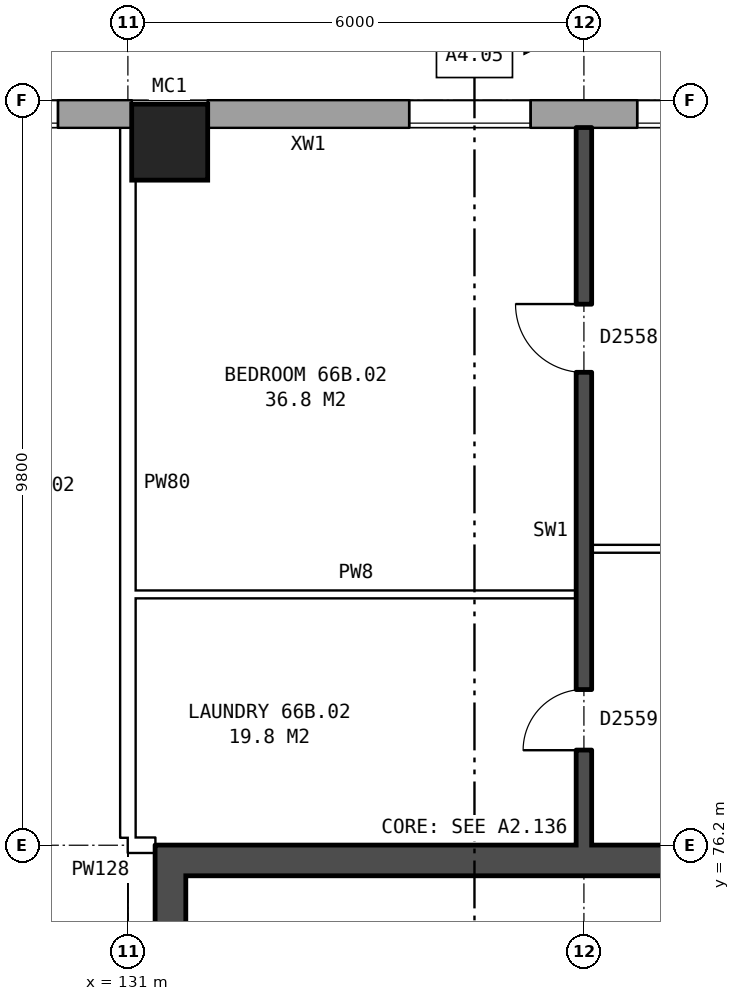
"""IFC4 building model, lengths in metres.
Left out: names, types, materials, properties, quantities, classifications, styles, units other than length and angle.
Written with IfcOpenShell. Run it as: python <this file> out.ifc"""

import sys

from ifc_helpers import new_model, si_unit, direction, frame, frame_2d, origin, origin_2d, place, context, subcontext, project, spatial, rectangle, hollow_rectangle, extrude, element, fill, save


model = new_model("IFC4")
c1 = context("Model", 3, precision=1e-05, world=origin(), true_north=direction((0.0, 1.0)))
c2 = subcontext(c1, "Body", "Model", "MODEL_VIEW")
j1 = project(units=[si_unit("LENGTHUNIT", "METRE"), si_unit("PLANEANGLEUNIT", "RADIAN")], contexts=[c1])
p1 = place(None, origin())
s1 = spatial("IfcSite", under=j1, at=p1, CompositionType="ELEMENT")
p2 = place(p1, origin())
s2 = spatial("IfcBuilding", under=s1, at=p2, CompositionType="ELEMENT")
p3 = place(p2, frame((0.0, 0.0, 233.8)))
s3 = spatial("IfcBuildingStorey", under=s2, at=p3, CompositionType="ELEMENT", Elevation=233.8)
p4 = place(p3, frame((131.55, 85.45, 0.0), z_axis=(0.0, 0.0, 1.0), x_axis=(1.0, 0.0, 0.0)))
e1 = element("IfcColumn", 1, at=p4, inside=s3, PredefinedType="COLUMN", context=c2, shape_type="SweptSolid", body=[
    extrude(hollow_rectangle(XDim=1.0, YDim=1.0, WallThickness=0.055, at=origin_2d()), origin(), (0.0, 0.0, 1.0), 3.1),
])
p5 = place(p3, frame((165.925, 85.82, 0.0), z_axis=(0.0, 0.0, 1.0), x_axis=(-1.0, 0.0, 0.0)))
e2 = element("IfcWall", 2, at=p5, inside=s3, PredefinedType="STANDARD", context=c2, shape_type="SweptSolid", body=[
    extrude(rectangle(XDim=33.875, YDim=0.36, at=frame_2d((16.938, 0.0))), origin(), (0.0, 0.0, 1.0), 2.85),
])
p6 = place(p5, frame((2.625, 0.0, 0.8)))
e3 = element("IfcOpeningElement", 3, at=p6, cuts=e2, PredefinedType="OPENING", context=c2, shape_type="SweptSolid", body=[
    extrude(rectangle(XDim=1.6, YDim=1.8, at=frame_2d((0.8, 0.9))), frame((0.0, 0.19, 0.0), z_axis=(0.0, -1.0, 0.0), x_axis=(1.0, 0.0, 0.0)), (0.0, 0.0, 1.0), 0.38),
])
p7 = place(p5, frame((5.625, 0.0, 0.8)))
e4 = element("IfcOpeningElement", 4, at=p7, cuts=e2, PredefinedType="OPENING", context=c2, shape_type="SweptSolid", body=[
    extrude(rectangle(XDim=1.6, YDim=1.8, at=frame_2d((0.8, 0.9))), frame((0.0, 0.19, 0.0), z_axis=(0.0, -1.0, 0.0), x_axis=(1.0, 0.0, 0.0)), (0.0, 0.0, 1.0), 0.38),
])
p8 = place(p5, frame((8.625, 0.0, 0.8)))
e5 = element("IfcOpeningElement", 5, at=p8, cuts=e2, PredefinedType="OPENING", context=c2, shape_type="SweptSolid", body=[
    extrude(rectangle(XDim=1.6, YDim=1.8, at=frame_2d((0.8, 0.9))), frame((0.0, 0.19, 0.0), z_axis=(0.0, -1.0, 0.0), x_axis=(1.0, 0.0, 0.0)), (0.0, 0.0, 1.0), 0.38),
])
p9 = place(p5, frame((11.625, 0.0, 0.8)))
e6 = element("IfcOpeningElement", 6, at=p9, cuts=e2, PredefinedType="OPENING", context=c2, shape_type="SweptSolid", body=[
    extrude(rectangle(XDim=1.6, YDim=1.8, at=frame_2d((0.8, 0.9))), frame((0.0, 0.19, 0.0), z_axis=(0.0, -1.0, 0.0), x_axis=(1.0, 0.0, 0.0)), (0.0, 0.0, 1.0), 0.38),
])
p10 = place(p5, frame((14.075, 0.0, 1.45)))
e7 = element("IfcOpeningElement", 7, at=p10, cuts=e2, PredefinedType="OPENING", context=c2, shape_type="SweptSolid", body=[
    extrude(rectangle(XDim=0.6, YDim=0.9, at=frame_2d((0.3, 0.45))), frame((0.0, 0.19, 0.0), z_axis=(0.0, -1.0, 0.0), x_axis=(1.0, 0.0, 0.0)), (0.0, 0.0, 1.0), 0.38),
])
p11 = place(p5, frame((17.625, 0.0, 0.8)))
e8 = element("IfcOpeningElement", 8, at=p11, cuts=e2, PredefinedType="OPENING", context=c2, shape_type="SweptSolid", body=[
    extrude(rectangle(XDim=1.6, YDim=1.8, at=frame_2d((0.8, 0.9))), frame((0.0, 0.19, 0.0), z_axis=(0.0, -1.0, 0.0), x_axis=(1.0, 0.0, 0.0)), (0.0, 0.0, 1.0), 0.38),
])
p12 = place(p5, frame((20.625, 0.0, 0.8)))
e9 = element("IfcOpeningElement", 9, at=p12, cuts=e2, PredefinedType="OPENING", context=c2, shape_type="SweptSolid", body=[
    extrude(rectangle(XDim=1.6, YDim=1.8, at=frame_2d((0.8, 0.9))), frame((0.0, 0.19, 0.0), z_axis=(0.0, -1.0, 0.0), x_axis=(1.0, 0.0, 0.0)), (0.0, 0.0, 1.0), 0.38),
])
p13 = place(p5, frame((23.625, 0.0, 0.8)))
e10 = element("IfcOpeningElement", 10, at=p13, cuts=e2, PredefinedType="OPENING", context=c2, shape_type="SweptSolid", body=[
    extrude(rectangle(XDim=1.6, YDim=1.8, at=frame_2d((0.8, 0.9))), frame((0.0, 0.19, 0.0), z_axis=(0.0, -1.0, 0.0), x_axis=(1.0, 0.0, 0.0)), (0.0, 0.0, 1.0), 0.38),
])
p14 = place(p5, frame((26.625, 0.0, 0.8)))
e11 = element("IfcOpeningElement", 11, at=p14, cuts=e2, PredefinedType="OPENING", context=c2, shape_type="SweptSolid", body=[
    extrude(rectangle(XDim=1.6, YDim=1.8, at=frame_2d((0.8, 0.9))), frame((0.0, 0.19, 0.0), z_axis=(0.0, -1.0, 0.0), x_axis=(1.0, 0.0, 0.0)), (0.0, 0.0, 1.0), 0.38),
])
p15 = place(p5, frame((29.625, 0.0, 0.8)))
e12 = element("IfcOpeningElement", 12, at=p15, cuts=e2, PredefinedType="OPENING", context=c2, shape_type="SweptSolid", body=[
    extrude(rectangle(XDim=1.6, YDim=1.8, at=frame_2d((0.8, 0.9))), frame((0.0, 0.19, 0.0), z_axis=(0.0, -1.0, 0.0), x_axis=(1.0, 0.0, 0.0)), (0.0, 0.0, 1.0), 0.38),
])
p16 = place(p5, frame((15.575, 0.0, 0.15)))
e13 = element("IfcOpeningElement", 13, at=p16, cuts=e2, PredefinedType="OPENING", context=c2, shape_type="SweptSolid", body=[
    extrude(rectangle(XDim=0.6, YDim=0.9, at=frame_2d((0.3, 0.45))), frame((0.0, 0.19, 0.0), z_axis=(0.0, -1.0, 0.0), x_axis=(1.0, 0.0, 0.0)), (0.0, 0.0, 1.0), 0.38),
])
p17 = place(p3, frame((131.05, 85.82, 0.0), z_axis=(0.0, 0.0, 1.0), x_axis=(-1.0, 0.0, 0.0)))
e14 = element("IfcWall", 14, at=p17, inside=s3, PredefinedType="STANDARD", context=c2, shape_type="SweptSolid", body=[
    extrude(rectangle(XDim=55.1, YDim=0.36, at=frame_2d((27.55, 0.0))), origin(), (0.0, 0.0, 1.0), 2.85),
])
p18 = place(p17, frame((0.969, 0.0, 0.8)))
e15 = element("IfcOpeningElement", 15, at=p18, cuts=e14, PredefinedType="OPENING", context=c2, shape_type="SweptSolid", body=[
    extrude(rectangle(XDim=1.6, YDim=1.8, at=frame_2d((0.8, 0.9))), frame((0.0, 0.19, 0.0), z_axis=(0.0, -1.0, 0.0), x_axis=(1.0, 0.0, 0.0)), (0.0, 0.0, 1.0), 0.38),
])
p19 = place(p17, frame((4.406, 0.0, 0.8)))
e16 = element("IfcOpeningElement", 16, at=p19, cuts=e14, PredefinedType="OPENING", context=c2, shape_type="SweptSolid", body=[
    extrude(rectangle(XDim=1.6, YDim=1.8, at=frame_2d((0.8, 0.9))), frame((0.0, 0.19, 0.0), z_axis=(0.0, -1.0, 0.0), x_axis=(1.0, 0.0, 0.0)), (0.0, 0.0, 1.0), 0.38),
])
p20 = place(p17, frame((7.844, 0.0, 0.8)))
e17 = element("IfcOpeningElement", 17, at=p20, cuts=e14, PredefinedType="OPENING", context=c2, shape_type="SweptSolid", body=[
    extrude(rectangle(XDim=1.6, YDim=1.8, at=frame_2d((0.8, 0.9))), frame((0.0, 0.19, 0.0), z_axis=(0.0, -1.0, 0.0), x_axis=(1.0, 0.0, 0.0)), (0.0, 0.0, 1.0), 0.38),
])
p21 = place(p17, frame((11.281, 0.0, 0.8)))
e18 = element("IfcOpeningElement", 18, at=p21, cuts=e14, PredefinedType="OPENING", context=c2, shape_type="SweptSolid", body=[
    extrude(rectangle(XDim=1.6, YDim=1.8, at=frame_2d((0.8, 0.9))), frame((0.0, 0.19, 0.0), z_axis=(0.0, -1.0, 0.0), x_axis=(1.0, 0.0, 0.0)), (0.0, 0.0, 1.0), 0.38),
])
p22 = place(p17, frame((14.719, 0.0, 0.8)))
e19 = element("IfcOpeningElement", 19, at=p22, cuts=e14, PredefinedType="OPENING", context=c2, shape_type="SweptSolid", body=[
    extrude(rectangle(XDim=1.6, YDim=1.8, at=frame_2d((0.8, 0.9))), frame((0.0, 0.19, 0.0), z_axis=(0.0, -1.0, 0.0), x_axis=(1.0, 0.0, 0.0)), (0.0, 0.0, 1.0), 0.38),
])
p23 = place(p17, frame((18.156, 0.0, 0.8)))
e20 = element("IfcOpeningElement", 20, at=p23, cuts=e14, PredefinedType="OPENING", context=c2, shape_type="SweptSolid", body=[
    extrude(rectangle(XDim=1.6, YDim=1.8, at=frame_2d((0.8, 0.9))), frame((0.0, 0.19, 0.0), z_axis=(0.0, -1.0, 0.0), x_axis=(1.0, 0.0, 0.0)), (0.0, 0.0, 1.0), 0.38),
])
p24 = place(p17, frame((21.594, 0.0, 0.8)))
e21 = element("IfcOpeningElement", 21, at=p24, cuts=e14, PredefinedType="OPENING", context=c2, shape_type="SweptSolid", body=[
    extrude(rectangle(XDim=1.6, YDim=1.8, at=frame_2d((0.8, 0.9))), frame((0.0, 0.19, 0.0), z_axis=(0.0, -1.0, 0.0), x_axis=(1.0, 0.0, 0.0)), (0.0, 0.0, 1.0), 0.38),
])
p25 = place(p17, frame((25.031, 0.0, 0.8)))
e22 = element("IfcOpeningElement", 22, at=p25, cuts=e14, PredefinedType="OPENING", context=c2, shape_type="SweptSolid", body=[
    extrude(rectangle(XDim=1.6, YDim=1.8, at=frame_2d((0.8, 0.9))), frame((0.0, 0.19, 0.0), z_axis=(0.0, -1.0, 0.0), x_axis=(1.0, 0.0, 0.0)), (0.0, 0.0, 1.0), 0.38),
])
p26 = place(p17, frame((28.469, 0.0, 0.8)))
e23 = element("IfcOpeningElement", 23, at=p26, cuts=e14, PredefinedType="OPENING", context=c2, shape_type="SweptSolid", body=[
    extrude(rectangle(XDim=1.6, YDim=1.8, at=frame_2d((0.8, 0.9))), frame((0.0, 0.19, 0.0), z_axis=(0.0, -1.0, 0.0), x_axis=(1.0, 0.0, 0.0)), (0.0, 0.0, 1.0), 0.38),
])
p27 = place(p17, frame((31.906, 0.0, 0.8)))
e24 = element("IfcOpeningElement", 24, at=p27, cuts=e14, PredefinedType="OPENING", context=c2, shape_type="SweptSolid", body=[
    extrude(rectangle(XDim=1.6, YDim=1.8, at=frame_2d((0.8, 0.9))), frame((0.0, 0.19, 0.0), z_axis=(0.0, -1.0, 0.0), x_axis=(1.0, 0.0, 0.0)), (0.0, 0.0, 1.0), 0.38),
])
p28 = place(p17, frame((35.344, 0.0, 0.8)))
e25 = element("IfcOpeningElement", 25, at=p28, cuts=e14, PredefinedType="OPENING", context=c2, shape_type="SweptSolid", body=[
    extrude(rectangle(XDim=1.6, YDim=1.8, at=frame_2d((0.8, 0.9))), frame((0.0, 0.19, 0.0), z_axis=(0.0, -1.0, 0.0), x_axis=(1.0, 0.0, 0.0)), (0.0, 0.0, 1.0), 0.38),
])
p29 = place(p17, frame((38.781, 0.0, 0.8)))
e26 = element("IfcOpeningElement", 26, at=p29, cuts=e14, PredefinedType="OPENING", context=c2, shape_type="SweptSolid", body=[
    extrude(rectangle(XDim=1.6, YDim=1.8, at=frame_2d((0.8, 0.9))), frame((0.0, 0.19, 0.0), z_axis=(0.0, -1.0, 0.0), x_axis=(1.0, 0.0, 0.0)), (0.0, 0.0, 1.0), 0.38),
])
p30 = place(p17, frame((42.219, 0.0, 0.8)))
e27 = element("IfcOpeningElement", 27, at=p30, cuts=e14, PredefinedType="OPENING", context=c2, shape_type="SweptSolid", body=[
    extrude(rectangle(XDim=1.6, YDim=1.8, at=frame_2d((0.8, 0.9))), frame((0.0, 0.19, 0.0), z_axis=(0.0, -1.0, 0.0), x_axis=(1.0, 0.0, 0.0)), (0.0, 0.0, 1.0), 0.38),
])
p31 = place(p17, frame((45.656, 0.0, 0.8)))
e28 = element("IfcOpeningElement", 28, at=p31, cuts=e14, PredefinedType="OPENING", context=c2, shape_type="SweptSolid", body=[
    extrude(rectangle(XDim=1.6, YDim=1.8, at=frame_2d((0.8, 0.9))), frame((0.0, 0.19, 0.0), z_axis=(0.0, -1.0, 0.0), x_axis=(1.0, 0.0, 0.0)), (0.0, 0.0, 1.0), 0.38),
])
p32 = place(p17, frame((49.094, 0.0, 0.8)))
e29 = element("IfcOpeningElement", 29, at=p32, cuts=e14, PredefinedType="OPENING", context=c2, shape_type="SweptSolid", body=[
    extrude(rectangle(XDim=1.6, YDim=1.8, at=frame_2d((0.8, 0.9))), frame((0.0, 0.19, 0.0), z_axis=(0.0, -1.0, 0.0), x_axis=(1.0, 0.0, 0.0)), (0.0, 0.0, 1.0), 0.38),
])
p33 = place(p17, frame((52.531, 0.0, 0.8)))
e30 = element("IfcOpeningElement", 30, at=p33, cuts=e14, PredefinedType="OPENING", context=c2, shape_type="SweptSolid", body=[
    extrude(rectangle(XDim=1.6, YDim=1.8, at=frame_2d((0.8, 0.9))), frame((0.0, 0.19, 0.0), z_axis=(0.0, -1.0, 0.0), x_axis=(1.0, 0.0, 0.0)), (0.0, 0.0, 1.0), 0.38),
])
p34 = place(p3, frame((131.56, 63.8, 0.0), z_axis=(0.0, 0.0, 1.0), x_axis=(0.0, 1.0, 0.0)))
e31 = element("IfcWall", 31, at=p34, inside=s3, PredefinedType="SHEAR", context=c2, shape_type="SweptSolid", body=[
    extrude(rectangle(XDim=12.4, YDim=0.4, at=frame_2d((6.2, 0.0))), origin(), (0.0, 0.0, 1.0), 2.85),
])
p35 = place(p34, frame((9.8, 0.0, 0.0)))
e32 = element("IfcOpeningElement", 32, at=p35, cuts=e31, PredefinedType="OPENING", context=c2, shape_type="SweptSolid", body=[
    extrude(rectangle(XDim=1.1, YDim=2.1, at=frame_2d((0.55, 1.05))), frame((0.0, 0.21, 0.0), z_axis=(0.0, -1.0, 0.0), x_axis=(1.0, 0.0, 0.0)), (0.0, 0.0, 1.0), 0.42),
])
p36 = place(p3, frame((139.36, 76.0, 0.0), z_axis=(0.0, 0.0, 1.0), x_axis=(-1.0, 0.0, 0.0)))
e33 = element("IfcWall", 33, at=p36, inside=s3, PredefinedType="SHEAR", context=c2, shape_type="SweptSolid", body=[
    extrude(rectangle(XDim=7.6, YDim=0.4, at=frame_2d((3.8, 0.0))), origin(), (0.0, 0.0, 1.0), 2.85),
])
p37 = place(p3, frame((131.0, 76.2, 0.0), z_axis=(0.0, 0.0, 1.0), x_axis=(1.0, 0.0, 0.0)))
e34 = element("IfcWall", 34, at=p37, inside=s3, PredefinedType="PARTITIONING", context=c2, shape_type="SweptSolid", body=[
    extrude(rectangle(XDim=0.36, YDim=0.2, at=frame_2d((0.18, 0.0))), origin(), (0.0, 0.0, 1.0), 2.85),
])
p38 = place(p3, frame((131.1, 79.5, 0.0), z_axis=(0.0, 0.0, 1.0), x_axis=(1.0, 0.0, 0.0)))
e35 = element("IfcWall", 35, at=p38, inside=s3, PredefinedType="PARTITIONING", context=c2, shape_type="SweptSolid", body=[
    extrude(rectangle(XDim=5.8, YDim=0.1, at=frame_2d((2.9, 0.0))), origin(), (0.0, 0.0, 1.0), 2.85),
])
p39 = place(p3, frame((137.1, 80.1, 0.0), z_axis=(0.0, 0.0, 1.0), x_axis=(1.0, 0.0, 0.0)))
e36 = element("IfcWall", 36, at=p39, inside=s3, PredefinedType="PARTITIONING", context=c2, shape_type="SweptSolid", body=[
    extrude(rectangle(XDim=5.8, YDim=0.1, at=frame_2d((2.9, 0.0))), origin(), (0.0, 0.0, 1.0), 2.85),
])
p40 = place(p39, frame((1.3, 0.0, 0.0)))
e37 = element("IfcOpeningElement", 37, at=p40, cuts=e36, PredefinedType="OPENING", context=c2, shape_type="SweptSolid", body=[
    extrude(rectangle(XDim=0.9, YDim=2.1, at=frame_2d((0.45, 1.05))), frame((0.0, 0.06, 0.0), z_axis=(0.0, -1.0, 0.0), x_axis=(1.0, 0.0, 0.0)), (0.0, 0.0, 1.0), 0.12),
])
p41 = place(p39, frame((4.2, 0.0, 0.0)))
e38 = element("IfcOpeningElement", 38, at=p41, cuts=e36, PredefinedType="OPENING", context=c2, shape_type="SweptSolid", body=[
    extrude(rectangle(XDim=0.9, YDim=2.1, at=frame_2d((0.45, 1.05))), frame((0.0, 0.06, 0.0), z_axis=(0.0, -1.0, 0.0), x_axis=(1.0, 0.0, 0.0)), (0.0, 0.0, 1.0), 0.12),
])
p42 = place(p3, frame((131.0, 76.3, 0.0), z_axis=(0.0, 0.0, 1.0), x_axis=(0.0, 1.0, 0.0)))
e39 = element("IfcWall", 39, at=p42, inside=s3, PredefinedType="PARTITIONING", context=c2, shape_type="SweptSolid", body=[
    extrude(rectangle(XDim=9.34, YDim=0.2, at=frame_2d((4.67, 0.0))), origin(), (0.0, 0.0, 1.0), 2.85),
])
p43 = place(p3, frame((137.0, 76.2, 0.0), z_axis=(0.0, 0.0, 1.0), x_axis=(0.0, 1.0, 0.0)))
e40 = element("IfcWall", 40, at=p43, inside=s3, PredefinedType="SOLIDWALL", context=c2, shape_type="SweptSolid", body=[
    extrude(rectangle(XDim=9.44, YDim=0.2, at=frame_2d((4.72, 0.0))), origin(), (0.0, 0.0, 1.0), 2.85),
])
p44 = place(p43, frame((6.22, 0.0, 0.0)))
e41 = element("IfcOpeningElement", 41, at=p44, cuts=e40, PredefinedType="OPENING", context=c2, shape_type="SweptSolid", body=[
    extrude(rectangle(XDim=0.9, YDim=2.1, at=frame_2d((0.45, 1.05))), frame((0.0, 0.11, 0.0), z_axis=(0.0, -1.0, 0.0), x_axis=(1.0, 0.0, 0.0)), (0.0, 0.0, 1.0), 0.22),
])
p45 = place(p43, frame((1.25, 0.0, 0.0)))
e42 = element("IfcOpeningElement", 42, at=p45, cuts=e40, PredefinedType="OPENING", context=c2, shape_type="SweptSolid", body=[
    extrude(rectangle(XDim=0.8, YDim=2.1, at=frame_2d((0.4, 1.05))), frame((0.0, 0.11, 0.0), z_axis=(0.0, -1.0, 0.0), x_axis=(1.0, 0.0, 0.0)), (0.0, 0.0, 1.0), 0.22),
])
p46 = place(p14, origin())
e43 = element("IfcWindow", 43, at=p46, inside=s3, PartitioningType="SINGLE_PANEL", PredefinedType="WINDOW", context=c2, shape_type="SweptSolid", body=[
    extrude(rectangle(XDim=1.6, YDim=1.8, at=frame_2d((0.8, 0.9))), frame((0.0, 0.15, 0.0), z_axis=(0.0, -1.0, 0.0), x_axis=(1.0, 0.0, 0.0)), (0.0, 0.0, 1.0), 0.06),
])
fill(e11, e43)
p47 = place(p15, origin())
e44 = element("IfcWindow", 44, at=p47, inside=s3, PartitioningType="SINGLE_PANEL", PredefinedType="WINDOW", context=c2, shape_type="SweptSolid", body=[
    extrude(rectangle(XDim=1.6, YDim=1.8, at=frame_2d((0.8, 0.9))), frame((0.0, 0.15, 0.0), z_axis=(0.0, -1.0, 0.0), x_axis=(1.0, 0.0, 0.0)), (0.0, 0.0, 1.0), 0.06),
])
fill(e12, e44)
p48 = place(p18, origin())
e45 = element("IfcWindow", 45, at=p48, inside=s3, PartitioningType="SINGLE_PANEL", PredefinedType="WINDOW", context=c2, shape_type="SweptSolid", body=[
    extrude(rectangle(XDim=1.6, YDim=1.8, at=frame_2d((0.8, 0.9))), frame((0.0, 0.15, 0.0), z_axis=(0.0, -1.0, 0.0), x_axis=(1.0, 0.0, 0.0)), (0.0, 0.0, 1.0), 0.06),
])
fill(e15, e45)
p49 = place(p44, origin())
e46 = element("IfcDoor", 46, at=p49, inside=s3, OperationType="SINGLE_SWING_RIGHT", PredefinedType="DOOR", context=c2, shape_type="SweptSolid", body=[
    extrude(rectangle(XDim=0.9, YDim=2.1, at=frame_2d((0.45, 1.05))), frame((0.0, 0.025, 0.0), z_axis=(0.0, -1.0, 0.0), x_axis=(1.0, 0.0, 0.0)), (0.0, 0.0, 1.0), 0.05),
])
fill(e41, e46)
p50 = place(p45, origin())
e47 = element("IfcDoor", 47, at=p50, inside=s3, OperationType="SINGLE_SWING_LEFT", PredefinedType="DOOR", context=c2, shape_type="SweptSolid", body=[
    extrude(rectangle(XDim=0.8, YDim=2.1, at=frame_2d((0.4, 1.05))), frame((0.0, 0.025, 0.0), z_axis=(0.0, -1.0, 0.0), x_axis=(1.0, 0.0, 0.0)), (0.0, 0.0, 1.0), 0.05),
])
fill(e42, e47)
save(model, sys.argv[1])
